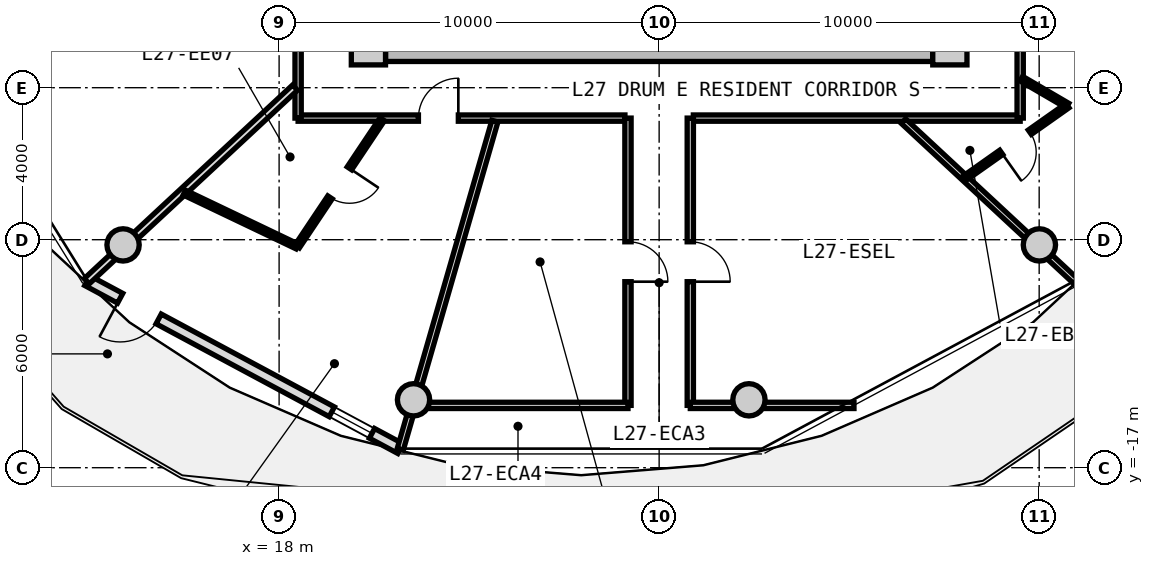
"""IFC4 building model, lengths in metres.
Left out: names, types, materials, properties, quantities, classifications, styles, units other than length and angle.
Written with IfcOpenShell. Run it as: python <this file> out.ifc"""

import sys

from ifc_helpers import new_model, si_unit, direction, frame, frame_2d, origin, origin_2d, place, context, subcontext, project, spatial, rectangle, circle, extrude, source, transform, mapped, element, fill, save


model = new_model("IFC4")
c1 = context("Model", 3, precision=1e-05, world=origin(), true_north=direction((0.0, 1.0)))
c2 = subcontext(c1, "Body", "Model", "MODEL_VIEW")
j1 = project(units=[si_unit("LENGTHUNIT", "METRE"), si_unit("PLANEANGLEUNIT", "RADIAN")], contexts=[c1])
p1 = place(None, origin())
s1 = spatial("IfcSite", under=j1, at=p1, CompositionType="ELEMENT")
p2 = place(p1, origin())
s2 = spatial("IfcBuilding", under=s1, at=p2, CompositionType="ELEMENT")
p3 = place(p2, frame((0.0, 0.0, 90.15)))
s3 = spatial("IfcBuildingStorey", under=s2, at=p3, CompositionType="ELEMENT", Elevation=90.15)
m1 = source(origin(), c2, "Body", "SweptSolid", [
    extrude(rectangle(XDim=0.9, YDim=0.9, at=origin_2d()), origin(), (0.0, 0.0, 1.0), 3.05),
])
for number, where, z_axis, x_axis in (
    (1, (20.35, -5.95, 0.0), (0.0, 0.0, 1.0), (1.0, 0.0, 0.0)),
    (2, (35.65, -5.95, 0.0), (0.0, 0.0, 1.0), (1.0, 0.0, 0.0)),
):
    element("IfcColumn", number, at=place(p3, frame(where, z_axis=z_axis, x_axis=x_axis)), inside=s3, PredefinedType="COLUMN", context=c2, shape_type="MappedRepresentation", body=[
        mapped(m1, transform((0.0, 0.0, 0.0), x_axis=(1.0, 0.0, 0.0), y_axis=(0.0, 1.0, 0.0), z_axis=(0.0, 0.0, 1.0), scale=1.0)),
    ])
m2 = source(origin(), c2, "Body", "SweptSolid", [
    extrude(rectangle(XDim=14.4, YDim=0.72, at=frame_2d((7.2, 0.0))), origin(), (0.0, 0.0, 1.0), 2.79),
])
p4 = place(p3, frame((35.2, -5.95, 0.0), z_axis=(0.0, 0.0, 1.0), x_axis=(-1.0, 0.0, 0.0)))
e3 = element("IfcWall", 3, at=p4, inside=s3, PredefinedType="SHEAR", context=c2, shape_type="MappedRepresentation", body=[
    mapped(m2, transform((0.0, 0.0, 0.0), x_axis=(1.0, 0.0, 0.0), y_axis=(0.0, 1.0, 0.0), z_axis=(0.0, 0.0, 1.0), scale=1.0)),
])
m3 = source(origin(), c2, "Body", "SweptSolid", [
    extrude(circle(Radius=0.425, at=origin_2d()), origin(), (0.0, 0.0, 1.0), 3.05),
])
for number, where, z_axis, x_axis in (
    (4, (13.894, -11.137, 0.0), (0.0, 0.0, 1.0), (1.0, 0.0, 0.0)),
    (5, (21.537, -15.213, 0.0), (0.0, 0.0, 1.0), (1.0, 0.0, 0.0)),
    (6, (30.363, -15.213, 0.0), (0.0, 0.0, 1.0), (1.0, 0.0, 0.0)),
    (7, (38.006, -11.137, 0.0), (0.0, 0.0, 1.0), (1.0, 0.0, 0.0)),
):
    element("IfcColumn", number, at=place(p3, frame(where, z_axis=z_axis, x_axis=x_axis)), inside=s3, PredefinedType="COLUMN", context=c2, shape_type="MappedRepresentation", body=[
        mapped(m3, transform((0.0, 0.0, 0.0), x_axis=(1.0, 0.0, 0.0), y_axis=(0.0, 1.0, 0.0), z_axis=(0.0, 0.0, 1.0), scale=1.0)),
    ])
m4 = source(origin(), c2, "Body", "SweptSolid", [
    extrude(rectangle(XDim=9.351, YDim=0.29, at=frame_2d((4.675, 0.0))), origin(), (0.0, 0.0, 1.0), 2.79),
])
p5 = place(p3, frame((21.193, -16.498, 0.0), z_axis=(0.0, 0.0, 1.0), x_axis=(-0.881184411073, 0.472772708267, 0.0)))
e8 = element("IfcWall", 8, at=p5, inside=s3, PredefinedType="SOLIDWALL", context=c2, shape_type="MappedRepresentation", body=[
    mapped(m4, transform((0.0, 0.0, 0.0), x_axis=(1.0, 0.0, 0.0), y_axis=(0.0, 1.0, 0.0), z_axis=(0.0, 0.0, 1.0), scale=1.0)),
])
p6 = place(p5, frame((7.22, 0.0, 0.0)))
e9 = element("IfcOpeningElement", 9, at=p6, cuts=e8, PredefinedType="OPENING", context=c2, shape_type="SweptSolid", body=[
    extrude(rectangle(XDim=1.15, YDim=2.25, at=frame_2d((0.575, 1.125))), frame((0.0, 0.155, 0.0), z_axis=(0.0, -1.0, 0.0), x_axis=(1.0, 0.0, 0.0)), (0.0, 0.0, 1.0), 0.31),
])
p7 = place(p5, frame((0.85, 0.0, 0.85)))
e10 = element("IfcOpeningElement", 10, at=p7, cuts=e8, PredefinedType="OPENING", context=c2, shape_type="SweptSolid", body=[
    extrude(rectangle(XDim=1.2, YDim=1.5, at=frame_2d((0.6, 0.75))), frame((0.0, 0.155, 0.0), z_axis=(0.0, -1.0, 0.0), x_axis=(1.0, 0.0, 0.0)), (0.0, 0.0, 1.0), 0.31),
])
m5 = source(origin(), c2, "Body", "SweptSolid", [
    extrude(rectangle(XDim=8.6, YDim=0.165, at=frame_2d((4.3, 0.0))), origin(), (0.0, 0.0, 1.0), 2.775),
])
p8 = place(p3, frame((37.5, -7.8, 0.0), z_axis=(0.0, 0.0, 1.0), x_axis=(-1.0, 0.0, 0.0)))
e11 = element("IfcWall", 11, at=p8, inside=s3, PredefinedType="PARTITIONING", context=c2, shape_type="MappedRepresentation", body=[
    mapped(m5, transform((0.0, 0.0, 0.0), x_axis=(1.0, 0.0, 0.0), y_axis=(0.0, 1.0, 0.0), z_axis=(0.0, 0.0, 1.0), scale=1.0)),
])
p9 = place(p3, frame((27.1, -7.8, 0.0), z_axis=(0.0, 0.0, 1.0), x_axis=(-1.0, 0.0, 0.0)))
e12 = element("IfcWall", 12, at=p9, inside=s3, PredefinedType="PARTITIONING", context=c2, shape_type="MappedRepresentation", body=[
    mapped(m5, transform((0.0, 0.0, 0.0), x_axis=(1.0, 0.0, 0.0), y_axis=(0.0, 1.0, 0.0), z_axis=(0.0, 0.0, 1.0), scale=1.0)),
])
p10 = place(p9, frame((4.384, 0.0, 0.0)))
e13 = element("IfcOpeningElement", 13, at=p10, cuts=e12, PredefinedType="OPENING", context=c2, shape_type="SweptSolid", body=[
    extrude(rectangle(XDim=1.05, YDim=2.15, at=frame_2d((0.525, 1.075))), frame((0.0, 0.093, 0.0), z_axis=(0.0, -1.0, 0.0), x_axis=(1.0, 0.0, 0.0)), (0.0, 0.0, 1.0), 0.185),
])
m6 = source(origin(), c2, "Body", "SweptSolid", [
    extrude(rectangle(XDim=15.6, YDim=0.165, at=frame_2d((7.8, 0.0))), origin(), (0.0, 0.0, 1.0), 2.775),
])
p11 = place(p3, frame((18.5, -7.8, 0.0), z_axis=(0.0, 0.0, 1.0), x_axis=(0.0, 1.0, 0.0)))
e14 = element("IfcWall", 14, at=p11, inside=s3, PredefinedType="PARTITIONING", context=c2, shape_type="MappedRepresentation", body=[
    mapped(m6, transform((0.0, 0.0, 0.0), x_axis=(1.0, 0.0, 0.0), y_axis=(0.0, 1.0, 0.0), z_axis=(0.0, 0.0, 1.0), scale=1.0)),
])
p12 = place(p11, frame((7.134, 0.0, 0.0)))
e15 = element("IfcOpeningElement", 15, at=p12, cuts=e14, PredefinedType="OPENING", context=c2, shape_type="SweptSolid", body=[
    extrude(rectangle(XDim=1.25, YDim=2.2, at=frame_2d((0.625, 1.1))), frame((0.0, 0.093, 0.0), z_axis=(0.0, -1.0, 0.0), x_axis=(1.0, 0.0, 0.0)), (0.0, 0.0, 1.0), 0.185),
])
p13 = place(p3, frame((37.5, 7.8, 0.0), z_axis=(0.0, 0.0, 1.0), x_axis=(0.0, -1.0, 0.0)))
e16 = element("IfcWall", 16, at=p13, inside=s3, PredefinedType="PARTITIONING", context=c2, shape_type="MappedRepresentation", body=[
    mapped(m6, transform((0.0, 0.0, 0.0), x_axis=(1.0, 0.0, 0.0), y_axis=(0.0, 1.0, 0.0), z_axis=(0.0, 0.0, 1.0), scale=1.0)),
])
p14 = place(p13, frame((9.177, 0.0, 0.0)))
e17 = element("IfcOpeningElement", 17, at=p14, cuts=e16, PredefinedType="OPENING", context=c2, shape_type="SweptSolid", body=[
    extrude(rectangle(XDim=1.05, YDim=2.15, at=frame_2d((0.525, 1.075))), frame((0.0, 0.093, 0.0), z_axis=(0.0, -1.0, 0.0), x_axis=(1.0, 0.0, 0.0)), (0.0, 0.0, 1.0), 0.185),
])
m7 = source(origin(), c2, "Body", "SweptSolid", [
    extrude(rectangle(XDim=8.989, YDim=0.165, at=frame_2d((4.495, 0.0))), origin(), (0.0, 0.0, 1.0), 2.275),
])
p15 = place(p3, frame((23.678, -7.88, 0.0), z_axis=(0.0, 0.0, 1.0), x_axis=(-0.27702323008, -0.960863221274, 0.0)))
e18 = element("IfcWall", 18, at=p15, inside=s3, PredefinedType="PARTITIONING", context=c2, shape_type="MappedRepresentation", body=[
    mapped(m7, transform((0.0, 0.0, 0.0), x_axis=(1.0, 0.0, 0.0), y_axis=(0.0, 1.0, 0.0), z_axis=(0.0, 0.0, 1.0), scale=1.0)),
])
m8 = source(origin(), c2, "Body", "SweptSolid", [
    extrude(rectangle(XDim=6.187, YDim=0.165, at=frame_2d((3.093, 0.0))), origin(), (0.0, 0.0, 1.0), 2.275),
])
p16 = place(p3, frame((34.429, -7.88, 0.0), z_axis=(0.0, 0.0, 1.0), x_axis=(0.732501077882, -0.680765870841, 0.0)))
e19 = element("IfcWall", 19, at=p16, inside=s3, PredefinedType="PARTITIONING", context=c2, shape_type="MappedRepresentation", body=[
    mapped(m8, transform((0.0, 0.0, 0.0), x_axis=(1.0, 0.0, 0.0), y_axis=(0.0, 1.0, 0.0), z_axis=(0.0, 0.0, 1.0), scale=1.0)),
])
m9 = source(origin(), c2, "Body", "SweptSolid", [
    extrude(rectangle(XDim=7.56, YDim=0.165, at=frame_2d((3.78, 0.0))), origin(), (0.0, 0.0, 1.0), 2.775),
])
p17 = place(p3, frame((27.18, -15.36, 0.0), z_axis=(0.0, 0.0, 1.0), x_axis=(0.0, 1.0, 0.0)))
e20 = element("IfcWall", 20, at=p17, inside=s3, PredefinedType="PARTITIONING", context=c2, shape_type="MappedRepresentation", body=[
    mapped(m9, transform((0.0, 0.0, 0.0), x_axis=(1.0, 0.0, 0.0), y_axis=(0.0, 1.0, 0.0), z_axis=(0.0, 0.0, 1.0), scale=1.0)),
])
p18 = place(p17, frame((3.255, 0.0, 0.0)))
e21 = element("IfcOpeningElement", 21, at=p18, cuts=e20, PredefinedType="OPENING", context=c2, shape_type="SweptSolid", body=[
    extrude(rectangle(XDim=1.05, YDim=2.15, at=frame_2d((0.525, 1.075))), frame((0.0, 0.093, 0.0), z_axis=(0.0, -1.0, 0.0), x_axis=(1.0, 0.0, 0.0)), (0.0, 0.0, 1.0), 0.185),
])
m10 = source(origin(), c2, "Body", "SweptSolid", [
    extrude(rectangle(XDim=5.814, YDim=0.165, at=frame_2d((2.907, 0.0))), origin(), (0.0, 0.0, 1.0), 2.275),
])
p19 = place(p3, frame((21.366, -15.36, 0.0), z_axis=(0.0, 0.0, 1.0), x_axis=(1.0, 0.0, 0.0)))
e22 = element("IfcWall", 22, at=p19, inside=s3, PredefinedType="PARTITIONING", context=c2, shape_type="MappedRepresentation", body=[
    mapped(m10, transform((0.0, 0.0, 0.0), x_axis=(1.0, 0.0, 0.0), y_axis=(0.0, 1.0, 0.0), z_axis=(0.0, 0.0, 1.0), scale=1.0)),
])
p20 = place(p3, frame((28.82, -15.36, 0.0), z_axis=(0.0, 0.0, 1.0), x_axis=(0.0, 1.0, 0.0)))
e23 = element("IfcWall", 23, at=p20, inside=s3, PredefinedType="PARTITIONING", context=c2, shape_type="MappedRepresentation", body=[
    mapped(m9, transform((0.0, 0.0, 0.0), x_axis=(1.0, 0.0, 0.0), y_axis=(0.0, 1.0, 0.0), z_axis=(0.0, 0.0, 1.0), scale=1.0)),
])
p21 = place(p20, frame((3.255, 0.0, 0.0)))
e24 = element("IfcOpeningElement", 24, at=p21, cuts=e23, PredefinedType="OPENING", context=c2, shape_type="SweptSolid", body=[
    extrude(rectangle(XDim=1.05, YDim=2.15, at=frame_2d((0.525, 1.075))), frame((0.0, 0.093, 0.0), z_axis=(0.0, -1.0, 0.0), x_axis=(1.0, 0.0, 0.0)), (0.0, 0.0, 1.0), 0.185),
])
m11 = source(origin(), c2, "Body", "SweptSolid", [
    extrude(rectangle(XDim=4.307, YDim=0.165, at=frame_2d((2.153, 0.0))), origin(), (0.0, 0.0, 1.0), 2.275),
])
p22 = place(p3, frame((28.82, -15.36, 0.0), z_axis=(0.0, 0.0, 1.0), x_axis=(1.0, 0.0, 0.0)))
e25 = element("IfcWall", 25, at=p22, inside=s3, PredefinedType="PARTITIONING", context=c2, shape_type="MappedRepresentation", body=[
    mapped(m11, transform((0.0, 0.0, 0.0), x_axis=(1.0, 0.0, 0.0), y_axis=(0.0, 1.0, 0.0), z_axis=(0.0, 0.0, 1.0), scale=1.0)),
])
m12 = source(origin(), c2, "Body", "SweptSolid", [
    extrude(rectangle(XDim=7.482, YDim=0.19, at=frame_2d((3.741, 0.0))), origin(), (0.0, 0.0, 1.0), 2.275),
])
p23 = place(p3, frame((18.42, -6.998, 0.0), z_axis=(0.0, 0.0, 1.0), x_axis=(-0.732508698043, -0.680757671489, 0.0)))
e26 = element("IfcWall", 26, at=p23, inside=s3, PredefinedType="PARTITIONING", context=c2, shape_type="MappedRepresentation", body=[
    mapped(m12, transform((0.0, 0.0, 0.0), x_axis=(1.0, 0.0, 0.0), y_axis=(0.0, 1.0, 0.0), z_axis=(0.0, 0.0, 1.0), scale=1.0)),
])
m13 = source(origin(), c2, "Body", "SweptSolid", [
    extrude(rectangle(XDim=4.027, YDim=0.14, at=frame_2d((2.014, 0.0))), origin(), (0.0, 0.0, 1.0), 2.775),
])
p24 = place(p3, frame((20.714, -7.83, 0.0), z_axis=(0.0, 0.0, 1.0), x_axis=(-0.555832825922, -0.831294093343, 0.0)))
e27 = element("IfcWall", 27, at=p24, inside=s3, PredefinedType="PARTITIONING", context=c2, shape_type="MappedRepresentation", body=[
    mapped(m13, transform((0.0, 0.0, 0.0), x_axis=(1.0, 0.0, 0.0), y_axis=(0.0, 1.0, 0.0), z_axis=(0.0, 0.0, 1.0), scale=1.0)),
])
p25 = place(p24, frame((1.554, 0.0, 0.0)))
e28 = element("IfcOpeningElement", 28, at=p25, cuts=e27, PredefinedType="OPENING", context=c2, shape_type="SweptSolid", body=[
    extrude(rectangle(XDim=0.92, YDim=2.1, at=frame_2d((0.46, 1.05))), frame((0.0, 0.08, 0.0), z_axis=(0.0, -1.0, 0.0), x_axis=(1.0, 0.0, 0.0)), (0.0, 0.0, 1.0), 0.16),
])
m14 = source(origin(), c2, "Body", "SweptSolid", [
    extrude(rectangle(XDim=3.291, YDim=0.14, at=frame_2d((1.646, 0.0))), origin(), (0.0, 0.0, 1.0), 2.775),
])
p26 = place(p3, frame((18.476, -11.178, 0.0), z_axis=(0.0, 0.0, 1.0), x_axis=(-0.902381393443, 0.430938302739, 0.0)))
e29 = element("IfcWall", 29, at=p26, inside=s3, PredefinedType="PARTITIONING", context=c2, shape_type="MappedRepresentation", body=[
    mapped(m14, transform((0.0, 0.0, 0.0), x_axis=(1.0, 0.0, 0.0), y_axis=(0.0, 1.0, 0.0), z_axis=(0.0, 0.0, 1.0), scale=1.0)),
])
m15 = source(origin(), c2, "Body", "SweptSolid", [
    extrude(rectangle(XDim=1.407, YDim=0.14, at=frame_2d((0.704, 0.0))), origin(), (0.0, 0.0, 1.0), 2.775),
])
p27 = place(p3, frame((37.53, -6.762, 0.0), z_axis=(0.0, 0.0, 1.0), x_axis=(0.863539718977, -0.504280828258, 0.0)))
e30 = element("IfcWall", 30, at=p27, inside=s3, PredefinedType="PARTITIONING", context=c2, shape_type="MappedRepresentation", body=[
    mapped(m15, transform((0.0, 0.0, 0.0), x_axis=(1.0, 0.0, 0.0), y_axis=(0.0, 1.0, 0.0), z_axis=(0.0, 0.0, 1.0), scale=1.0)),
])
m16 = source(origin(), c2, "Body", "SweptSolid", [
    extrude(rectangle(XDim=3.347, YDim=0.14, at=frame_2d((1.673, 0.0))), origin(), (0.0, 0.0, 1.0), 2.775),
])
p28 = place(p3, frame((38.745, -7.472, 0.0), z_axis=(0.0, 0.0, 1.0), x_axis=(-0.81705680263, -0.576557179537, 0.0)))
e31 = element("IfcWall", 31, at=p28, inside=s3, PredefinedType="PARTITIONING", context=c2, shape_type="MappedRepresentation", body=[
    mapped(m16, transform((0.0, 0.0, 0.0), x_axis=(1.0, 0.0, 0.0), y_axis=(0.0, 1.0, 0.0), z_axis=(0.0, 0.0, 1.0), scale=1.0)),
])
p29 = place(p28, frame((1.214, 0.0, 0.0)))
e32 = element("IfcOpeningElement", 32, at=p29, cuts=e31, PredefinedType="OPENING", context=c2, shape_type="SweptSolid", body=[
    extrude(rectangle(XDim=0.92, YDim=2.1, at=frame_2d((0.46, 1.05))), frame((0.0, 0.08, 0.0), z_axis=(0.0, -1.0, 0.0), x_axis=(1.0, 0.0, 0.0)), (0.0, 0.0, 1.0), 0.16),
])
m17 = source(origin(), c2, "Body", "SweptSolid", [
    extrude(rectangle(XDim=1.15, YDim=2.25, at=frame_2d((0.575, 1.125))), frame((0.0, 0.025, 0.0), z_axis=(0.0, -1.0, 0.0), x_axis=(1.0, 0.0, 0.0)), (0.0, 0.0, 1.0), 0.05),
])
p30 = place(p6, origin())
e33 = element("IfcDoor", 33, at=p30, inside=s3, OperationType="SINGLE_SWING_RIGHT", PredefinedType="DOOR", context=c2, shape_type="MappedRepresentation", body=[
    mapped(m17, transform((0.0, 0.0, 0.0), x_axis=(1.0, 0.0, 0.0), y_axis=(0.0, 1.0, 0.0), z_axis=(0.0, 0.0, 1.0), scale=1.0)),
])
fill(e9, e33)
m18 = source(origin(), c2, "Body", "SweptSolid", [
    extrude(rectangle(XDim=1.2, YDim=1.5, at=frame_2d((0.6, 0.75))), frame((0.0, 0.03, 0.0), z_axis=(0.0, -1.0, 0.0), x_axis=(1.0, 0.0, 0.0)), (0.0, 0.0, 1.0), 0.06),
])
p31 = place(p7, origin())
e34 = element("IfcWindow", 34, at=p31, inside=s3, PartitioningType="SINGLE_PANEL", PredefinedType="WINDOW", context=c2, shape_type="MappedRepresentation", body=[
    mapped(m18, transform((0.0, 0.0, 0.0), x_axis=(1.0, 0.0, 0.0), y_axis=(0.0, 1.0, 0.0), z_axis=(0.0, 0.0, 1.0), scale=1.0)),
])
fill(e10, e34)
m19 = source(origin(), c2, "Body", "SweptSolid", [
    extrude(rectangle(XDim=1.05, YDim=2.15, at=frame_2d((0.525, 1.075))), frame((0.0, 0.025, 0.0), z_axis=(0.0, -1.0, 0.0), x_axis=(1.0, 0.0, 0.0)), (0.0, 0.0, 1.0), 0.05),
])
p32 = place(p18, frame((1.05, 0.0, 0.0), z_axis=(0.0, 0.0, 1.0), x_axis=(-1.0, 0.0, 0.0)))
e35 = element("IfcDoor", 35, at=p32, inside=s3, OperationType="SINGLE_SWING_RIGHT", PredefinedType="DOOR", context=c2, shape_type="MappedRepresentation", body=[
    mapped(m19, transform((0.0, 0.0, 0.0), x_axis=(1.0, 0.0, 0.0), y_axis=(0.0, 1.0, 0.0), z_axis=(0.0, 0.0, 1.0), scale=1.0)),
])
fill(e21, e35)
p33 = place(p21, frame((1.05, 0.0, 0.0), z_axis=(0.0, 0.0, 1.0), x_axis=(-1.0, 0.0, 0.0)))
e36 = element("IfcDoor", 36, at=p33, inside=s3, OperationType="SINGLE_SWING_RIGHT", PredefinedType="DOOR", context=c2, shape_type="MappedRepresentation", body=[
    mapped(m19, transform((0.0, 0.0, 0.0), x_axis=(1.0, 0.0, 0.0), y_axis=(0.0, 1.0, 0.0), z_axis=(0.0, 0.0, 1.0), scale=1.0)),
])
fill(e24, e36)
p34 = place(p10, frame((1.05, 0.0, 0.0), z_axis=(0.0, 0.0, 1.0), x_axis=(-1.0, 0.0, 0.0)))
e37 = element("IfcDoor", 37, at=p34, inside=s3, OperationType="SINGLE_SWING_RIGHT", PredefinedType="DOOR", context=c2, shape_type="MappedRepresentation", body=[
    mapped(m19, transform((0.0, 0.0, 0.0), x_axis=(1.0, 0.0, 0.0), y_axis=(0.0, 1.0, 0.0), z_axis=(0.0, 0.0, 1.0), scale=1.0)),
])
fill(e13, e37)
m20 = source(origin(), c2, "Body", "SweptSolid", [
    extrude(rectangle(XDim=0.92, YDim=2.1, at=frame_2d((0.46, 1.05))), frame((0.0, 0.025, 0.0), z_axis=(0.0, -1.0, 0.0), x_axis=(1.0, 0.0, 0.0)), (0.0, 0.0, 1.0), 0.05),
])
p35 = place(p25, origin())
e38 = element("IfcDoor", 38, at=p35, inside=s3, OperationType="SINGLE_SWING_LEFT", PredefinedType="DOOR", context=c2, shape_type="MappedRepresentation", body=[
    mapped(m20, transform((0.0, 0.0, 0.0), x_axis=(1.0, 0.0, 0.0), y_axis=(0.0, 1.0, 0.0), z_axis=(0.0, 0.0, 1.0), scale=1.0)),
])
fill(e28, e38)
p36 = place(p29, origin())
e39 = element("IfcDoor", 39, at=p36, inside=s3, OperationType="SINGLE_SWING_RIGHT", PredefinedType="DOOR", context=c2, shape_type="MappedRepresentation", body=[
    mapped(m20, transform((0.0, 0.0, 0.0), x_axis=(1.0, 0.0, 0.0), y_axis=(0.0, 1.0, 0.0), z_axis=(0.0, 0.0, 1.0), scale=1.0)),
])
fill(e32, e39)
save(model, sys.argv[1])
